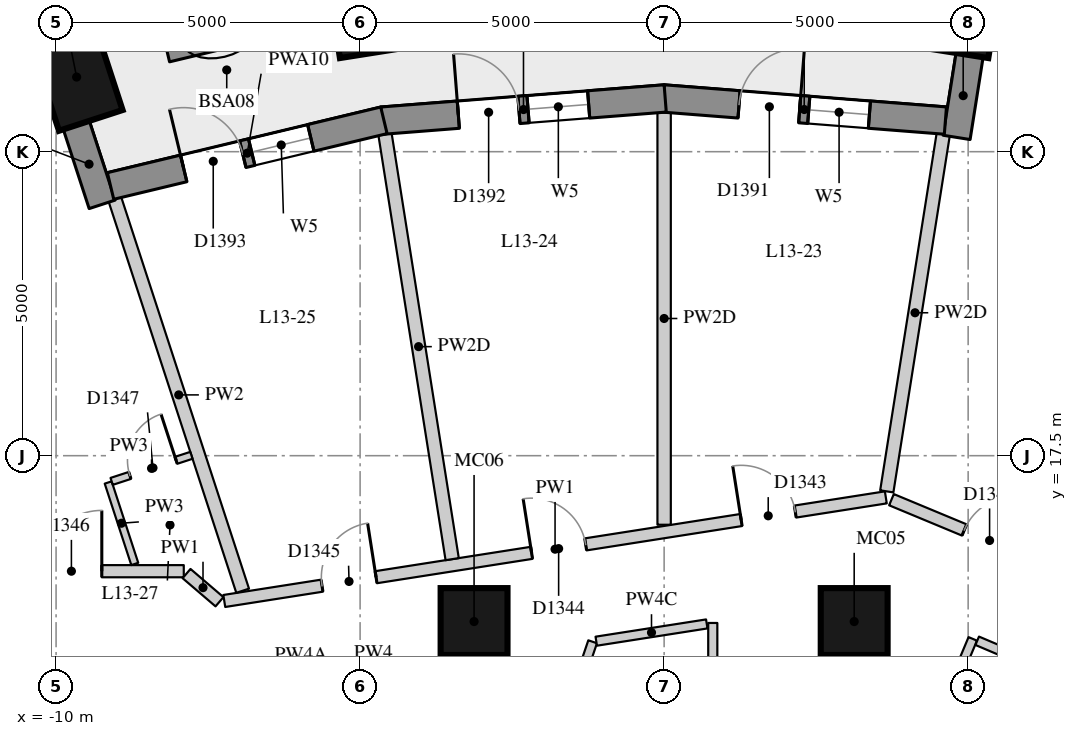
"""IFC4 building model, lengths in metres.
Left out: names, types, materials, properties, quantities, classifications, styles, units other than length and angle.
Written with IfcOpenShell. Run it as: python <this file> out.ifc"""

import sys

from ifc_helpers import new_model, si_unit, direction, frame, frame_2d, origin, origin_2d, place, context, subcontext, project, spatial, rectangle, extrude, element, fill, save


model = new_model("IFC4")
c1 = context("Model", 3, precision=1e-05, world=origin(), true_north=direction((0.0, 1.0)))
c2 = subcontext(c1, "Body", "Model", "MODEL_VIEW")
j1 = project(units=[si_unit("LENGTHUNIT", "METRE"), si_unit("PLANEANGLEUNIT", "RADIAN")], contexts=[c1])
p1 = place(None, origin())
s1 = spatial("IfcSite", under=j1, at=p1, CompositionType="ELEMENT")
p2 = place(p1, origin())
s2 = spatial("IfcBuilding", under=s1, at=p2, CompositionType="ELEMENT")
p3 = place(p2, frame((0.0, 0.0, 51.4)))
s3 = spatial("IfcBuildingStorey", under=s2, at=p3, CompositionType="ELEMENT", Elevation=51.4)
for number, where, z_axis, x_axis in (
    (1, (4.906, 24.866, 0.0), (0.0, 0.0, 1.0), (0.156, 0.988, 0.0)),
    (2, (-4.906, 24.866, 0.0), (0.0, 0.0, 1.0), (-0.156, 0.988, 0.0)),
    (3, (-9.662, 23.727, 0.0), (0.0, 0.0, 1.0), (-0.31, 0.951, 0.0)),
):
    element("IfcColumn", number, at=place(p3, frame(where, z_axis=z_axis, x_axis=x_axis)), inside=s3, PredefinedType="COLUMN", context=c2, shape_type="SweptSolid", body=[
        extrude(rectangle(XDim=1.5, YDim=1.1, at=origin_2d()), origin(), (0.0, 0.0, 1.0), 3.3),
    ])
for number, where, z_axis, x_axis in (
    (4, (3.126, 14.772, 0.0), (0.0, 0.0, 1.0), (1.0, 0.0, 0.0)),
    (5, (-3.126, 14.772, 0.0), (0.0, 0.0, 1.0), (1.0, 0.0, 0.0)),
):
    element("IfcColumn", number, at=place(p3, frame(where, z_axis=z_axis, x_axis=x_axis)), inside=s3, PredefinedType="COLUMN", context=c2, shape_type="SweptSolid", body=[
        extrude(rectangle(XDim=1.1, YDim=1.1, at=origin_2d()), origin(), (0.0, 0.0, 1.0), 3.3),
    ])
p4 = place(p3, frame((9.308, 24.35, 0.0), z_axis=(0.0, 0.0, 1.0), x_axis=(-0.972496561493, 0.232917233979, 0.0)))
e6 = element("IfcWall", 6, at=p4, inside=s3, PredefinedType="SOLIDWALL", context=c2, shape_type="SweptSolid", body=[
    extrude(rectangle(XDim=3.911, YDim=0.45, at=frame_2d((1.956, 0.0))), origin(), (0.0, 0.0, 1.0), 3.02),
])
p5 = place(p4, frame((0.855, 0.0, 0.4)))
e7 = element("IfcOpeningElement", 7, at=p5, cuts=e6, PredefinedType="OPENING", context=c2, shape_type="SweptSolid", body=[
    extrude(rectangle(XDim=2.2, YDim=1.75, at=frame_2d((1.1, 0.875))), frame((0.0, 0.235, 0.0), z_axis=(0.0, -1.0, 0.0), x_axis=(1.0, 0.0, 0.0)), (0.0, 0.0, 1.0), 0.47),
])
p6 = place(p3, frame((5.027, 24.108, 0.0), z_axis=(0.0, 0.0, 1.0), x_axis=(-0.156133927791, -0.98773589415, 0.0)))
e8 = element("IfcWall", 8, at=p6, inside=s3, PredefinedType="SOLIDWALL", context=c2, shape_type="SweptSolid", body=[
    extrude(rectangle(XDim=1.39, YDim=0.45, at=frame_2d((0.695, 0.0))), origin(), (0.0, 0.0, 1.0), 2.47),
])
p7 = place(p3, frame((-9.674, 22.956, 0.0), z_axis=(0.0, 0.0, 1.0), x_axis=(0.310269011655, -0.950648799719, 0.0)))
e9 = element("IfcWall", 9, at=p7, inside=s3, PredefinedType="SOLIDWALL", context=c2, shape_type="SweptSolid", body=[
    extrude(rectangle(XDim=1.39, YDim=0.45, at=frame_2d((0.695, 0.0))), origin(), (0.0, 0.0, 1.0), 3.02),
])
p8 = place(p3, frame((4.626, 23.011, 0.0), z_axis=(0.0, 0.0, 1.0), x_axis=(-0.996937095772, 0.078207589615, 0.0)))
e10 = element("IfcWall", 10, at=p8, inside=s3, PredefinedType="SOLIDWALL", context=c2, shape_type="SweptSolid", body=[
    extrude(rectangle(XDim=4.657, YDim=0.45, at=frame_2d((2.329, 0.0))), origin(), (0.0, 0.0, 1.0), 3.02),
])
p9 = place(p8, frame((1.254, 0.0, 0.4)))
e11 = element("IfcOpeningElement", 11, at=p9, cuts=e10, PredefinedType="OPENING", context=c2, shape_type="SweptSolid", body=[
    extrude(rectangle(XDim=1.0, YDim=1.75, at=frame_2d((0.5, 0.875))), frame((0.0, 0.235, 0.0), z_axis=(0.0, -1.0, 0.0), x_axis=(1.0, 0.0, 0.0)), (0.0, 0.0, 1.0), 0.47),
])
p10 = place(p8, frame((2.404, 0.0, 0.0)))
e12 = element("IfcOpeningElement", 12, at=p10, cuts=e10, PredefinedType="OPENING", context=c2, shape_type="SweptSolid", body=[
    extrude(rectangle(XDim=1.0, YDim=2.15, at=frame_2d((0.5, 1.075))), frame((0.0, 0.235, 0.0), z_axis=(0.0, -1.0, 0.0), x_axis=(1.0, 0.0, 0.0)), (0.0, 0.0, 1.0), 0.47),
])
p11 = place(p3, frame((0.018, 23.376, 0.0), z_axis=(0.0, 0.0, 1.0), x_axis=(-0.996935982964, -0.078221773648, 0.0)))
e13 = element("IfcWall", 13, at=p11, inside=s3, PredefinedType="SOLIDWALL", context=c2, shape_type="SweptSolid", body=[
    extrude(rectangle(XDim=4.676, YDim=0.45, at=frame_2d((2.338, 0.0))), origin(), (0.0, 0.0, 1.0), 3.02),
])
p12 = place(p11, frame((1.263, 0.0, 0.4)))
e14 = element("IfcOpeningElement", 14, at=p12, cuts=e13, PredefinedType="OPENING", context=c2, shape_type="SweptSolid", body=[
    extrude(rectangle(XDim=1.0, YDim=1.75, at=frame_2d((0.5, 0.875))), frame((0.0, 0.235, 0.0), z_axis=(0.0, -1.0, 0.0), x_axis=(1.0, 0.0, 0.0)), (0.0, 0.0, 1.0), 0.47),
])
p13 = place(p11, frame((2.413, 0.0, 0.0)))
e15 = element("IfcOpeningElement", 15, at=p13, cuts=e13, PredefinedType="OPENING", context=c2, shape_type="SweptSolid", body=[
    extrude(rectangle(XDim=1.0, YDim=2.15, at=frame_2d((0.5, 1.075))), frame((0.0, 0.235, 0.0), z_axis=(0.0, -1.0, 0.0), x_axis=(1.0, 0.0, 0.0)), (0.0, 0.0, 1.0), 0.47),
])
p14 = place(p3, frame((-4.608, 23.016, 0.0), z_axis=(0.0, 0.0, 1.0), x_axis=(-0.972343667289, -0.233554688847, 0.0)))
e16 = element("IfcWall", 16, at=p14, inside=s3, PredefinedType="SOLIDWALL", context=c2, shape_type="SweptSolid", body=[
    extrude(rectangle(XDim=4.624, YDim=0.45, at=frame_2d((2.312, 0.0))), origin(), (0.0, 0.0, 1.0), 3.02),
])
p15 = place(p14, frame((1.237, 0.0, 0.4)))
e17 = element("IfcOpeningElement", 17, at=p15, cuts=e16, PredefinedType="OPENING", context=c2, shape_type="SweptSolid", body=[
    extrude(rectangle(XDim=1.0, YDim=1.75, at=frame_2d((0.5, 0.875))), frame((0.0, 0.235, 0.0), z_axis=(0.0, -1.0, 0.0), x_axis=(1.0, 0.0, 0.0)), (0.0, 0.0, 1.0), 0.47),
])
p16 = place(p14, frame((2.387, 0.0, 0.0)))
e18 = element("IfcOpeningElement", 18, at=p16, cuts=e16, PredefinedType="OPENING", context=c2, shape_type="SweptSolid", body=[
    extrude(rectangle(XDim=1.0, YDim=2.15, at=frame_2d((0.5, 1.075))), frame((0.0, 0.235, 0.0), z_axis=(0.0, -1.0, 0.0), x_axis=(1.0, 0.0, 0.0)), (0.0, 0.0, 1.0), 0.47),
])
p17 = place(p3, frame((-6.465, 24.737, 0.0), z_axis=(0.0, 0.0, 1.0), x_axis=(-0.972504142103, -0.232885580473, 0.0)))
e19 = element("IfcWall", 19, at=p17, inside=s3, PredefinedType="USERDEFINED", context=c2, shape_type="SweptSolid", body=[
    extrude(rectangle(XDim=1.8, YDim=0.7, at=frame_2d((0.9, 0.0))), origin(), (0.0, 0.0, 1.0), 0.75),
])
p18 = place(p3, frame((-15.531, 15.6, 0.0), z_axis=(0.0, 0.0, 1.0), x_axis=(1.0, 0.0, 0.0)))
e20 = element("IfcWall", 20, at=p18, inside=s3, PredefinedType="PARTITIONING", context=c2, shape_type="SweptSolid", body=[
    extrude(rectangle(XDim=7.632, YDim=0.2, at=frame_2d((3.816, 0.0))), origin(), (0.0, 0.0, 1.0), 3.02),
])
p19 = place(p18, frame((5.283, 0.0, 0.0)))
e21 = element("IfcOpeningElement", 21, at=p19, cuts=e20, PredefinedType="OPENING", context=c2, shape_type="SweptSolid", body=[
    extrude(rectangle(XDim=1.0, YDim=2.1, at=frame_2d((0.5, 1.05))), frame((0.0, 0.11, 0.0), z_axis=(0.0, -1.0, 0.0), x_axis=(1.0, 0.0, 0.0)), (0.0, 0.0, 1.0), 0.22),
])
p20 = place(p18, frame((0.451, 0.0, 0.0)))
e22 = element("IfcOpeningElement", 22, at=p20, cuts=e20, PredefinedType="OPENING", context=c2, shape_type="SweptSolid", body=[
    extrude(rectangle(XDim=1.1, YDim=2.1, at=frame_2d((0.55, 1.05))), frame((0.0, 0.11, 0.0), z_axis=(0.0, -1.0, 0.0), x_axis=(1.0, 0.0, 0.0)), (0.0, 0.0, 1.0), 0.22),
])
p21 = place(p3, frame((-7.854, 15.561, 0.0), z_axis=(0.0, 0.0, 1.0), x_axis=(0.759763914627, -0.650199041856, 0.0)))
e23 = element("IfcWall", 23, at=p21, inside=s3, PredefinedType="PARTITIONING", context=c2, shape_type="SweptSolid", body=[
    extrude(rectangle(XDim=0.713, YDim=0.2, at=frame_2d((0.356, 0.0))), origin(), (0.0, 0.0, 1.0), 3.02),
])
p22 = place(p3, frame((-7.234, 15.11, 0.0), z_axis=(0.0, 0.0, 1.0), x_axis=(0.987957763282, 0.154723811906, 0.0)))
e24 = element("IfcWall", 24, at=p22, inside=s3, PredefinedType="PARTITIONING", context=c2, shape_type="SweptSolid", body=[
    extrude(rectangle(XDim=11.012, YDim=0.2, at=frame_2d((5.506, 0.0))), origin(), (0.0, 0.0, 1.0), 3.02),
])
p23 = place(p22, frame((8.605, 0.0, 0.0)))
e25 = element("IfcOpeningElement", 25, at=p23, cuts=e24, PredefinedType="OPENING", context=c2, shape_type="SweptSolid", body=[
    extrude(rectangle(XDim=0.9, YDim=2.1, at=frame_2d((0.45, 1.05))), frame((0.0, 0.11, 0.0), z_axis=(0.0, -1.0, 0.0), x_axis=(1.0, 0.0, 0.0)), (0.0, 0.0, 1.0), 0.22),
])
p24 = place(p22, frame((5.116, 0.0, 0.0)))
e26 = element("IfcOpeningElement", 26, at=p24, cuts=e24, PredefinedType="OPENING", context=c2, shape_type="SweptSolid", body=[
    extrude(rectangle(XDim=0.9, YDim=2.1, at=frame_2d((0.45, 1.05))), frame((0.0, 0.11, 0.0), z_axis=(0.0, -1.0, 0.0), x_axis=(1.0, 0.0, 0.0)), (0.0, 0.0, 1.0), 0.22),
])
p25 = place(p22, frame((1.626, 0.0, 0.0)))
e27 = element("IfcOpeningElement", 27, at=p25, cuts=e24, PredefinedType="OPENING", context=c2, shape_type="SweptSolid", body=[
    extrude(rectangle(XDim=0.9, YDim=2.1, at=frame_2d((0.45, 1.05))), frame((0.0, 0.11, 0.0), z_axis=(0.0, -1.0, 0.0), x_axis=(1.0, 0.0, 0.0)), (0.0, 0.0, 1.0), 0.22),
])
p26 = place(p3, frame((3.739, 16.776, 0.0), z_axis=(0.0, 0.0, 1.0), x_axis=(0.923364778497, -0.383923802117, 0.0)))
e28 = element("IfcWall", 28, at=p26, inside=s3, PredefinedType="PARTITIONING", context=c2, shape_type="SweptSolid", body=[
    extrude(rectangle(XDim=8.273, YDim=0.2, at=frame_2d((4.137, 0.0))), origin(), (0.0, 0.0, 1.0), 3.02),
])
p27 = place(p26, frame((6.153, 0.0, 0.0)))
e29 = element("IfcOpeningElement", 29, at=p27, cuts=e28, PredefinedType="OPENING", context=c2, shape_type="SweptSolid", body=[
    extrude(rectangle(XDim=1.1, YDim=2.1, at=frame_2d((0.55, 1.05))), frame((0.0, 0.11, 0.0), z_axis=(0.0, -1.0, 0.0), x_axis=(1.0, 0.0, 0.0)), (0.0, 0.0, 1.0), 0.22),
])
p28 = place(p26, frame((1.298, 0.0, 0.0)))
e30 = element("IfcOpeningElement", 30, at=p28, cuts=e28, PredefinedType="OPENING", context=c2, shape_type="SweptSolid", body=[
    extrude(rectangle(XDim=0.9, YDim=2.1, at=frame_2d((0.45, 1.05))), frame((0.0, 0.11, 0.0), z_axis=(0.0, -1.0, 0.0), x_axis=(1.0, 0.0, 0.0)), (0.0, 0.0, 1.0), 0.22),
])
p29 = place(p3, frame((0.8, 14.749, 0.0), z_axis=(0.0, 0.0, 1.0), x_axis=(0.0, -1.0, 0.0)))
e31 = element("IfcWall", 31, at=p29, inside=s3, PredefinedType="PARTITIONING", context=c2, shape_type="SweptSolid", body=[
    extrude(rectangle(XDim=5.599, YDim=0.15, at=frame_2d((2.799, 0.0))), origin(), (0.0, 0.0, 1.0), 3.02),
])
p30 = place(p3, frame((-1.567, 13.289, 0.0), z_axis=(0.0, 0.0, 1.0), x_axis=(0.321769415776, 0.946818062286, 0.0)))
e32 = element("IfcWall", 32, at=p30, inside=s3, PredefinedType="PARTITIONING", context=c2, shape_type="SweptSolid", body=[
    extrude(rectangle(XDim=1.215, YDim=0.15, at=frame_2d((0.607, 0.0))), origin(), (0.0, 0.0, 1.0), 3.02),
])
p31 = place(p3, frame((-1.116, 14.449, 0.0), z_axis=(0.0, 0.0, 1.0), x_axis=(0.988017726025, 0.154340445315, 0.0)))
e33 = element("IfcWall", 33, at=p31, inside=s3, PredefinedType="PARTITIONING", context=c2, shape_type="SweptSolid", body=[
    extrude(rectangle(XDim=1.84, YDim=0.15, at=frame_2d((0.92, 0.0))), origin(), (0.0, 0.0, 1.0), 2.42),
])
p32 = place(p3, frame((4.337, 12.724, 0.0), z_axis=(0.0, 0.0, 1.0), x_axis=(0.386537433901, 0.922273718694, 0.0)))
e34 = element("IfcWall", 34, at=p32, inside=s3, PredefinedType="PARTITIONING", context=c2, shape_type="SweptSolid", body=[
    extrude(rectangle(XDim=1.911, YDim=0.15, at=frame_2d((0.956, 0.0))), origin(), (0.0, 0.0, 1.0), 3.02),
])
p33 = place(p3, frame((5.149, 14.456, 0.0), z_axis=(0.0, 0.0, 1.0), x_axis=(0.920541383735, -0.390645057348, 0.0)))
e35 = element("IfcWall", 35, at=p33, inside=s3, PredefinedType="PARTITIONING", context=c2, shape_type="SweptSolid", body=[
    extrude(rectangle(XDim=6.124, YDim=0.15, at=frame_2d((3.062, 0.0))), origin(), (0.0, 0.0, 1.0), 3.02),
])
p34 = place(p33, frame((2.508, 0.0, 0.0)))
e36 = element("IfcOpeningElement", 36, at=p34, cuts=e35, PredefinedType="OPENING", context=c2, shape_type="SweptSolid", body=[
    extrude(rectangle(XDim=0.9, YDim=2.1, at=frame_2d((0.45, 1.05))), frame((0.0, 0.085, 0.0), z_axis=(0.0, -1.0, 0.0), x_axis=(1.0, 0.0, 0.0)), (0.0, 0.0, 1.0), 0.17),
])
p35 = place(p3, frame((4.591, 22.789, 0.0), z_axis=(0.0, 0.0, 1.0), x_axis=(-0.156126964527, -0.987736994826, 0.0)))
e37 = element("IfcWall", 37, at=p35, inside=s3, PredefinedType="PARTITIONING", context=c2, shape_type="SweptSolid", body=[
    extrude(rectangle(XDim=5.948, YDim=0.22, at=frame_2d((2.974, 0.0))), origin(), (0.0, 0.0, 1.0), 2.47),
])
p36 = place(p3, frame((0.0, 23.149, 0.0), z_axis=(0.0, 0.0, 1.0), x_axis=(0.0, -1.0, 0.0)))
e38 = element("IfcWall", 38, at=p36, inside=s3, PredefinedType="PARTITIONING", context=c2, shape_type="SweptSolid", body=[
    extrude(rectangle(XDim=6.784, YDim=0.22, at=frame_2d((3.392, 0.0))), origin(), (0.0, 0.0, 1.0), 2.47),
])
p37 = place(p3, frame((-4.591, 22.789, 0.0), z_axis=(0.0, 0.0, 1.0), x_axis=(0.15613617795, -0.987735538459, 0.0)))
e39 = element("IfcWall", 39, at=p37, inside=s3, PredefinedType="PARTITIONING", context=c2, shape_type="SweptSolid", body=[
    extrude(rectangle(XDim=7.077, YDim=0.22, at=frame_2d((3.539, 0.0))), origin(), (0.0, 0.0, 1.0), 2.47),
])
p38 = place(p3, frame((-9.034, 21.721, 0.0), z_axis=(0.0, 0.0, 1.0), x_axis=(0.310212430052, -0.950667264736, 0.0)))
e40 = element("IfcWall", 40, at=p38, inside=s3, PredefinedType="PARTITIONING", context=c2, shape_type="SweptSolid", body=[
    extrude(rectangle(XDim=6.777, YDim=0.22, at=frame_2d((3.388, 0.0))), origin(), (0.0, 0.0, 1.0), 3.02),
])
p39 = place(p3, frame((-8.706, 15.719, 0.0), z_axis=(0.0, 0.0, 1.0), x_axis=(-0.310245242974, 0.950656556918, 0.0)))
e41 = element("IfcWall", 41, at=p39, inside=s3, PredefinedType="PARTITIONING", context=c2, shape_type="SweptSolid", body=[
    extrude(rectangle(XDim=1.409, YDim=0.12, at=frame_2d((0.705, 0.0))), origin(), (0.0, 0.0, 1.0), 3.02),
])
p40 = place(p3, frame((-9.086, 17.077, 0.0), z_axis=(0.0, 0.0, 1.0), x_axis=(0.950576687533, 0.310489872812, 0.0)))
e42 = element("IfcWall", 42, at=p40, inside=s3, PredefinedType="PARTITIONING", context=c2, shape_type="SweptSolid", body=[
    extrude(rectangle(XDim=1.38, YDim=0.12, at=frame_2d((0.69, 0.0))), origin(), (0.0, 0.0, 1.0), 3.02),
])
p41 = place(p40, frame((0.315, 0.0, 0.0)))
e43 = element("IfcOpeningElement", 43, at=p41, cuts=e42, PredefinedType="OPENING", context=c2, shape_type="SweptSolid", body=[
    extrude(rectangle(XDim=0.8, YDim=2.1, at=frame_2d((0.4, 1.05))), frame((0.0, 0.07, 0.0), z_axis=(0.0, -1.0, 0.0), x_axis=(1.0, 0.0, 0.0)), (0.0, 0.0, 1.0), 0.14),
])
p42 = place(p9, origin())
e44 = element("IfcWindow", 44, at=p42, inside=s3, PartitioningType="SINGLE_PANEL", PredefinedType="WINDOW", context=c2, shape_type="SweptSolid", body=[
    extrude(rectangle(XDim=1.0, YDim=1.75, at=frame_2d((0.5, 0.875))), frame((0.0, 0.035, 0.0), z_axis=(0.0, -1.0, 0.0), x_axis=(1.0, 0.0, 0.0)), (0.0, 0.0, 1.0), 0.06),
])
fill(e11, e44)
p43 = place(p10, frame((1.0, 0.0, 0.0), z_axis=(0.0, 0.0, 1.0), x_axis=(-1.0, 0.0, 0.0)))
e45 = element("IfcDoor", 45, at=p43, inside=s3, OperationType="SINGLE_SWING_RIGHT", PredefinedType="DOOR", context=c2, shape_type="SweptSolid", body=[
    extrude(rectangle(XDim=1.0, YDim=2.15, at=frame_2d((0.5, 1.075))), frame((0.0, 0.075, 0.0), z_axis=(0.0, -1.0, 0.0), x_axis=(1.0, 0.0, 0.0)), (0.0, 0.0, 1.0), 0.05),
])
fill(e12, e45)
p44 = place(p12, origin())
e46 = element("IfcWindow", 46, at=p44, inside=s3, PartitioningType="SINGLE_PANEL", PredefinedType="WINDOW", context=c2, shape_type="SweptSolid", body=[
    extrude(rectangle(XDim=1.0, YDim=1.75, at=frame_2d((0.5, 0.875))), frame((0.0, 0.035, 0.0), z_axis=(0.0, -1.0, 0.0), x_axis=(1.0, 0.0, 0.0)), (0.0, 0.0, 1.0), 0.06),
])
fill(e14, e46)
p45 = place(p13, frame((1.0, 0.0, 0.0), z_axis=(0.0, 0.0, 1.0), x_axis=(-1.0, 0.0, 0.0)))
e47 = element("IfcDoor", 47, at=p45, inside=s3, OperationType="SINGLE_SWING_LEFT", PredefinedType="DOOR", context=c2, shape_type="SweptSolid", body=[
    extrude(rectangle(XDim=1.0, YDim=2.15, at=frame_2d((0.5, 1.075))), frame((0.0, 0.075, 0.0), z_axis=(0.0, -1.0, 0.0), x_axis=(1.0, 0.0, 0.0)), (0.0, 0.0, 1.0), 0.05),
])
fill(e15, e47)
p46 = place(p15, origin())
e48 = element("IfcWindow", 48, at=p46, inside=s3, PartitioningType="SINGLE_PANEL", PredefinedType="WINDOW", context=c2, shape_type="SweptSolid", body=[
    extrude(rectangle(XDim=1.0, YDim=1.75, at=frame_2d((0.5, 0.875))), frame((0.0, 0.035, 0.0), z_axis=(0.0, -1.0, 0.0), x_axis=(1.0, 0.0, 0.0)), (0.0, 0.0, 1.0), 0.06),
])
fill(e17, e48)
p47 = place(p16, frame((1.0, 0.0, 0.0), z_axis=(0.0, 0.0, 1.0), x_axis=(-1.0, 0.0, 0.0)))
e49 = element("IfcDoor", 49, at=p47, inside=s3, OperationType="SINGLE_SWING_LEFT", PredefinedType="DOOR", context=c2, shape_type="SweptSolid", body=[
    extrude(rectangle(XDim=1.0, YDim=2.15, at=frame_2d((0.5, 1.075))), frame((0.0, 0.075, 0.0), z_axis=(0.0, -1.0, 0.0), x_axis=(1.0, 0.0, 0.0)), (0.0, 0.0, 1.0), 0.05),
])
fill(e18, e49)
p48 = place(p28, origin())
e50 = element("IfcDoor", 50, at=p48, inside=s3, OperationType="SINGLE_SWING_RIGHT", PredefinedType="DOOR", context=c2, shape_type="SweptSolid", body=[
    extrude(rectangle(XDim=0.9, YDim=2.1, at=frame_2d((0.45, 1.05))), frame((0.0, 0.025, 0.0), z_axis=(0.0, -1.0, 0.0), x_axis=(1.0, 0.0, 0.0)), (0.0, 0.0, 1.0), 0.05),
])
fill(e30, e50)
p49 = place(p23, origin())
e51 = element("IfcDoor", 51, at=p49, inside=s3, OperationType="SINGLE_SWING_LEFT", PredefinedType="DOOR", context=c2, shape_type="SweptSolid", body=[
    extrude(rectangle(XDim=0.9, YDim=2.1, at=frame_2d((0.45, 1.05))), frame((0.0, 0.025, 0.0), z_axis=(0.0, -1.0, 0.0), x_axis=(1.0, 0.0, 0.0)), (0.0, 0.0, 1.0), 0.05),
])
fill(e25, e51)
p50 = place(p24, origin())
e52 = element("IfcDoor", 52, at=p50, inside=s3, OperationType="SINGLE_SWING_LEFT", PredefinedType="DOOR", context=c2, shape_type="SweptSolid", body=[
    extrude(rectangle(XDim=0.9, YDim=2.1, at=frame_2d((0.45, 1.05))), frame((0.0, 0.025, 0.0), z_axis=(0.0, -1.0, 0.0), x_axis=(1.0, 0.0, 0.0)), (0.0, 0.0, 1.0), 0.05),
])
fill(e26, e52)
p51 = place(p25, origin())
e53 = element("IfcDoor", 53, at=p51, inside=s3, OperationType="SINGLE_SWING_RIGHT", PredefinedType="DOOR", context=c2, shape_type="SweptSolid", body=[
    extrude(rectangle(XDim=0.9, YDim=2.1, at=frame_2d((0.45, 1.05))), frame((0.0, 0.025, 0.0), z_axis=(0.0, -1.0, 0.0), x_axis=(1.0, 0.0, 0.0)), (0.0, 0.0, 1.0), 0.05),
])
fill(e27, e53)
p52 = place(p19, origin())
e54 = element("IfcDoor", 54, at=p52, inside=s3, OperationType="SINGLE_SWING_RIGHT", PredefinedType="DOOR", context=c2, shape_type="SweptSolid", body=[
    extrude(rectangle(XDim=1.0, YDim=2.1, at=frame_2d((0.5, 1.05))), frame((0.0, 0.025, 0.0), z_axis=(0.0, -1.0, 0.0), x_axis=(1.0, 0.0, 0.0)), (0.0, 0.0, 1.0), 0.05),
])
fill(e21, e54)
p53 = place(p41, origin())
e55 = element("IfcDoor", 55, at=p53, inside=s3, OperationType="SINGLE_SWING_RIGHT", PredefinedType="DOOR", context=c2, shape_type="SweptSolid", body=[
    extrude(rectangle(XDim=0.8, YDim=2.1, at=frame_2d((0.4, 1.05))), frame((0.0, 0.025, 0.0), z_axis=(0.0, -1.0, 0.0), x_axis=(1.0, 0.0, 0.0)), (0.0, 0.0, 1.0), 0.05),
])
fill(e43, e55)
save(model, sys.argv[1])
